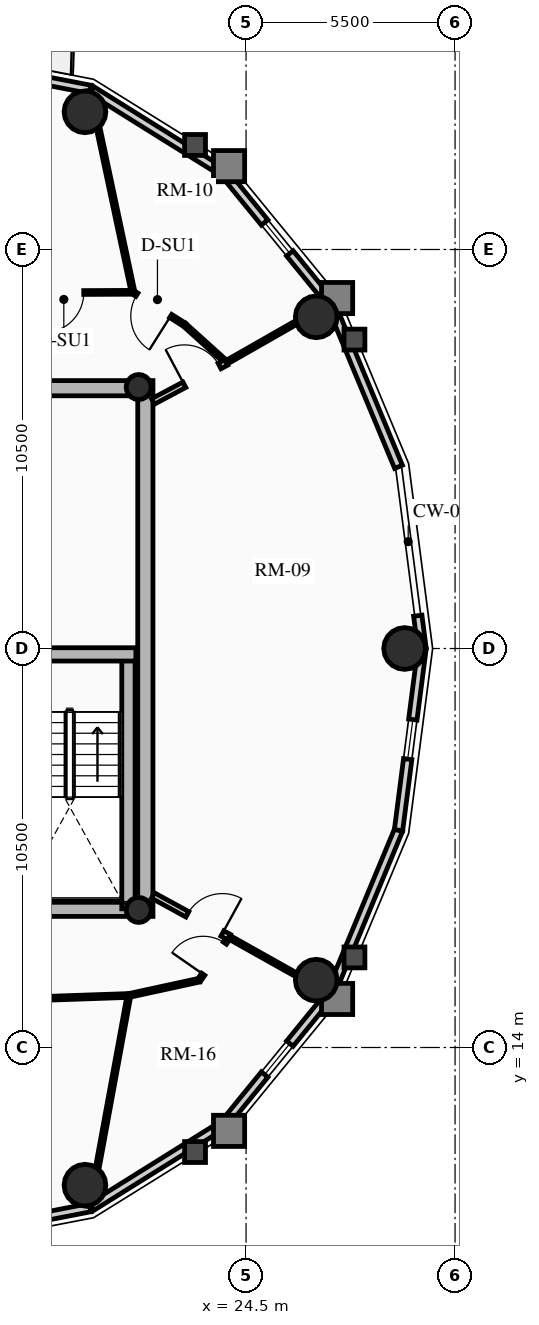
"""IFC4 building model, lengths in metres.
Left out: names, types, materials, properties, quantities, classifications, styles, units other than length and angle.
Written with IfcOpenShell. Run it as: python <this file> out.ifc"""

import sys

from ifc_helpers import new_model, si_unit, direction, frame, frame_2d, origin, origin_2d, place, context, subcontext, project, spatial, rectangle, circle, hollow_circle, extrude, source, transform, mapped, element, fill, save


model = new_model("IFC4")
c1 = context("Model", 3, precision=1e-05, world=origin(), true_north=direction((0.0, 1.0)))
c2 = subcontext(c1, "Body", "Model", "MODEL_VIEW")
j1 = project(units=[si_unit("LENGTHUNIT", "METRE"), si_unit("PLANEANGLEUNIT", "RADIAN")], contexts=[c1])
p1 = place(None, origin())
s1 = spatial("IfcSite", under=j1, at=p1, CompositionType="ELEMENT")
p2 = place(p1, origin())
s2 = spatial("IfcBuilding", under=s1, at=p2, CompositionType="ELEMENT")
p3 = place(p2, frame((0.0, 0.0, 232.45)))
s3 = spatial("IfcBuildingStorey", under=s2, at=p3, CompositionType="ELEMENT", Elevation=232.45)
p4 = place(p3, frame((21.85, 17.45, 0.0), z_axis=(0.0, 0.0, 1.0), x_axis=(0.0, 1.0, 0.0)))
e1 = element("IfcWall", 1, at=p4, inside=s3, PredefinedType="SHEAR", context=c2, shape_type="SweptSolid", body=[
    extrude(rectangle(XDim=14.1, YDim=0.4, at=frame_2d((7.05, 0.0))), origin(), (0.0, 0.0, 1.0), 3.2),
])
p5 = place(p3, frame((11.15, 17.65, 0.0), z_axis=(0.0, 0.0, 1.0), x_axis=(1.0, 0.0, 0.0)))
e2 = element("IfcWall", 2, at=p5, inside=s3, PredefinedType="SHEAR", context=c2, shape_type="SweptSolid", body=[
    extrude(rectangle(XDim=10.7, YDim=0.4, at=frame_2d((5.35, 0.0))), origin(), (0.0, 0.0, 1.0), 3.2),
])
m1 = source(origin(), c2, "Body", "SweptSolid", [
    extrude(rectangle(XDim=1.5, YDim=2.02, at=frame_2d((0.75, 1.01))), frame((0.0, 0.21, 0.0), z_axis=(0.0, -1.0, 0.0), x_axis=(1.0, 0.0, 0.0)), (0.0, 0.0, 1.0), 0.42),
])
p6 = place(p5, frame((5.45, 0.0, 0.0)))
e3 = element("IfcOpeningElement", 3, at=p6, cuts=e2, PredefinedType="OPENING", context=c2, shape_type="MappedRepresentation", body=[
    mapped(m1, transform((0.0, 0.0, 0.0), x_axis=(1.0, 0.0, 0.0), y_axis=(0.0, 1.0, 0.0), z_axis=(0.0, 0.0, 1.0), scale=1.0)),
])
p7 = place(p3, frame((11.15, 31.35, 0.0), z_axis=(0.0, 0.0, 1.0), x_axis=(1.0, 0.0, 0.0)))
e4 = element("IfcWall", 4, at=p7, inside=s3, PredefinedType="SHEAR", context=c2, shape_type="SweptSolid", body=[
    extrude(rectangle(XDim=10.7, YDim=0.4, at=frame_2d((5.35, 0.0))), origin(), (0.0, 0.0, 1.0), 3.2),
])
p8 = place(p7, frame((4.6, 0.0, 0.0)))
e5 = element("IfcOpeningElement", 5, at=p8, cuts=e4, PredefinedType="OPENING", context=c2, shape_type="MappedRepresentation", body=[
    mapped(m1, transform((0.0, 0.0, 0.0), x_axis=(1.0, 0.0, 0.0), y_axis=(0.0, 1.0, 0.0), z_axis=(0.0, 0.0, 1.0), scale=1.0)),
])
p9 = place(p3, frame((21.405, 17.65, 0.0), z_axis=(0.0, 0.0, 1.0), x_axis=(0.0, 1.0, 0.0)))
e6 = element("IfcWall", 6, at=p9, inside=s3, PredefinedType="SHEAR", context=c2, shape_type="SweptSolid", body=[
    extrude(rectangle(XDim=6.695, YDim=0.35, at=frame_2d((3.348, 0.0))), origin(), (0.0, 0.0, 1.0), 3.2),
])
p10 = place(p3, frame((18.315, 24.345, 0.0), z_axis=(0.0, 0.0, 1.0), x_axis=(1.0, 0.0, 0.0)))
e7 = element("IfcWall", 7, at=p10, inside=s3, PredefinedType="SHEAR", context=c2, shape_type="SweptSolid", body=[
    extrude(rectangle(XDim=3.285, YDim=0.35, at=frame_2d((1.643, 0.0))), origin(), (0.0, 0.0, 1.0), 3.2),
])
for number, where, z_axis, x_axis in (
    (8, (21.675, 17.62, 0.0), (0.0, 0.0, 1.0), (1.0, 0.0, 0.0)),
    (9, (21.675, 31.38, 0.0), (0.0, 0.0, 1.0), (1.0, 0.0, 0.0)),
):
    element("IfcColumn", number, at=place(p3, frame(where, z_axis=z_axis, x_axis=x_axis)), inside=s3, PredefinedType="COLUMN", context=c2, shape_type="SweptSolid", body=[
        extrude(hollow_circle(Radius=0.33, WallThickness=0.025, at=origin_2d()), origin(), (0.0, 0.0, 1.0), 3.2),
    ])
for number, where, z_axis, x_axis in (
    (10, (28.672, 24.5, 0.0), (0.0, 0.0, 1.0), (1.0, 0.0, 0.0)),
    (11, (26.347, 33.229, 0.0), (0.0, 0.0, 1.0), (1.0, 0.0, 0.0)),
    (12, (20.261, 38.623, 0.0), (0.0, 0.0, 1.0), (1.0, 0.0, 0.0)),
    (13, (20.261, 10.377, 0.0), (0.0, 0.0, 1.0), (1.0, 0.0, 0.0)),
    (14, (26.347, 15.771, 0.0), (0.0, 0.0, 1.0), (1.0, 0.0, 0.0)),
):
    element("IfcColumn", number, at=place(p3, frame(where, z_axis=z_axis, x_axis=x_axis)), inside=s3, PredefinedType="USERDEFINED", context=c2, shape_type="SweptSolid", body=[
        extrude(circle(Radius=0.55, at=origin_2d()), origin(), (0.0, 0.0, 1.0), 3.2),
    ])
p11 = place(p3, frame((29.018, 25.363, 0.0), z_axis=(0.0, 0.0, 1.0), x_axis=(0.128247365719, -0.991742211054, 0.0)))
e15 = element("IfcWall", 15, at=p11, inside=s3, PredefinedType="SOLIDWALL", context=c2, shape_type="SweptSolid", body=[
    extrude(rectangle(XDim=0.87, YDim=0.22, at=frame_2d((0.435, 0.0))), origin(), (0.0, 0.0, 1.0), 2.402),
])
p12 = place(p3, frame((26.718, 33.593, 0.0), z_axis=(0.0, 0.0, 1.0), x_axis=(0.384036305194, -0.923317993052, 0.0)))
e16 = element("IfcWall", 16, at=p12, inside=s3, PredefinedType="SOLIDWALL", context=c2, shape_type="SweptSolid", body=[
    extrude(rectangle(XDim=4.671, YDim=0.22, at=frame_2d((2.335, 0.0))), origin(), (0.0, 0.0, 1.0), 2.402),
])
p13 = place(p3, frame((23.924, 37.015, 0.0), z_axis=(0.0, 0.0, 1.0), x_axis=(0.632467166636, -0.774587169483, 0.0)))
e17 = element("IfcWall", 17, at=p13, inside=s3, PredefinedType="SOLIDWALL", context=c2, shape_type="SweptSolid", body=[
    extrude(rectangle(XDim=4.418, YDim=0.22, at=frame_2d((2.209, 0.0))), origin(), (0.0, 0.0, 1.0), 2.402),
])
m2 = source(origin(), c2, "Body", "SweptSolid", [
    extrude(rectangle(XDim=1.05, YDim=1.3, at=frame_2d((0.525, 0.65))), frame((0.0, 0.12, 0.0), z_axis=(0.0, -1.0, 0.0), x_axis=(1.0, 0.0, 0.0)), (0.0, 0.0, 1.0), 0.24),
])
p14 = place(p13, frame((1.684, 0.0, 0.65)))
e18 = element("IfcOpeningElement", 18, at=p14, cuts=e17, PredefinedType="OPENING", context=c2, shape_type="MappedRepresentation", body=[
    mapped(m2, transform((0.0, 0.0, 0.0), x_axis=(1.0, 0.0, 0.0), y_axis=(0.0, 1.0, 0.0), z_axis=(0.0, 0.0, 1.0), scale=1.0)),
])
p15 = place(p3, frame((20.403, 39.213, 0.0), z_axis=(0.0, 0.0, 1.0), x_axis=(0.848318713376, -0.529485939886, 0.0)))
e19 = element("IfcWall", 19, at=p15, inside=s3, PredefinedType="SOLIDWALL", context=c2, shape_type="SweptSolid", body=[
    extrude(rectangle(XDim=4.15, YDim=0.22, at=frame_2d((2.075, 0.0))), origin(), (0.0, 0.0, 1.0), 2.402),
])
p16 = place(p3, frame((16.5, 39.97, 0.0), z_axis=(0.0, 0.0, 1.0), x_axis=(0.981700307484, -0.190432419211, 0.0)))
e20 = element("IfcWall", 20, at=p16, inside=s3, PredefinedType="SOLIDWALL", context=c2, shape_type="SweptSolid", body=[
    extrude(rectangle(XDim=3.976, YDim=0.22, at=frame_2d((1.988, 0.0))), origin(), (0.0, 0.0, 1.0), 2.402),
])
m3 = source(origin(), c2, "Body", "SweptSolid", [
    extrude(rectangle(XDim=1.15, YDim=2.005, at=frame_2d((0.575, 1.002))), frame((0.0, 0.12, 0.0), z_axis=(0.0, -1.0, 0.0), x_axis=(1.0, 0.0, 0.0)), (0.0, 0.0, 1.0), 0.24),
])
p17 = place(p16, frame((1.413, 0.0, 0.0)))
e21 = element("IfcOpeningElement", 21, at=p17, cuts=e20, PredefinedType="OPENING", context=c2, shape_type="MappedRepresentation", body=[
    mapped(m3, transform((0.0, 0.0, 0.0), x_axis=(1.0, 0.0, 0.0), y_axis=(0.0, 1.0, 0.0), z_axis=(0.0, 0.0, 1.0), scale=1.0)),
])
p18 = place(p3, frame((20.403, 9.787, 0.0), z_axis=(0.0, 0.0, 1.0), x_axis=(-0.981700307484, -0.190432419211, 0.0)))
e22 = element("IfcWall", 22, at=p18, inside=s3, PredefinedType="SOLIDWALL", context=c2, shape_type="SweptSolid", body=[
    extrude(rectangle(XDim=3.976, YDim=0.22, at=frame_2d((1.988, 0.0))), origin(), (0.0, 0.0, 1.0), 2.402),
])
p19 = place(p18, frame((1.463, 0.0, 0.65)))
e23 = element("IfcOpeningElement", 23, at=p19, cuts=e22, PredefinedType="OPENING", context=c2, shape_type="MappedRepresentation", body=[
    mapped(m2, transform((0.0, 0.0, 0.0), x_axis=(1.0, 0.0, 0.0), y_axis=(0.0, 1.0, 0.0), z_axis=(0.0, 0.0, 1.0), scale=1.0)),
])
p20 = place(p3, frame((23.924, 11.985, 0.0), z_axis=(0.0, 0.0, 1.0), x_axis=(-0.848318713376, -0.529485939886, 0.0)))
e24 = element("IfcWall", 24, at=p20, inside=s3, PredefinedType="SOLIDWALL", context=c2, shape_type="SweptSolid", body=[
    extrude(rectangle(XDim=4.15, YDim=0.22, at=frame_2d((2.075, 0.0))), origin(), (0.0, 0.0, 1.0), 2.402),
])
p21 = place(p3, frame((26.718, 15.407, 0.0), z_axis=(0.0, 0.0, 1.0), x_axis=(-0.632467166636, -0.774587169483, 0.0)))
e25 = element("IfcWall", 25, at=p21, inside=s3, PredefinedType="SOLIDWALL", context=c2, shape_type="SweptSolid", body=[
    extrude(rectangle(XDim=4.418, YDim=0.22, at=frame_2d((2.209, 0.0))), origin(), (0.0, 0.0, 1.0), 2.402),
])
p22 = place(p21, frame((1.684, 0.0, 0.65)))
e26 = element("IfcOpeningElement", 26, at=p22, cuts=e25, PredefinedType="OPENING", context=c2, shape_type="MappedRepresentation", body=[
    mapped(m2, transform((0.0, 0.0, 0.0), x_axis=(1.0, 0.0, 0.0), y_axis=(0.0, 1.0, 0.0), z_axis=(0.0, 0.0, 1.0), scale=1.0)),
])
p23 = place(p3, frame((28.512, 19.719, 0.0), z_axis=(0.0, 0.0, 1.0), x_axis=(-0.384036305194, -0.923317993052, 0.0)))
e27 = element("IfcWall", 27, at=p23, inside=s3, PredefinedType="SOLIDWALL", context=c2, shape_type="SweptSolid", body=[
    extrude(rectangle(XDim=4.671, YDim=0.22, at=frame_2d((2.335, 0.0))), origin(), (0.0, 0.0, 1.0), 2.402),
])
p24 = place(p3, frame((29.13, 24.5, 0.0), z_axis=(0.0, 0.0, 1.0), x_axis=(-0.128241318541, -0.991742993027, 0.0)))
e28 = element("IfcWall", 28, at=p24, inside=s3, PredefinedType="SOLIDWALL", context=c2, shape_type="SweptSolid", body=[
    extrude(rectangle(XDim=4.82, YDim=0.22, at=frame_2d((2.41, 0.0))), origin(), (0.0, 0.0, 1.0), 2.402),
])
p25 = place(p24, frame((1.885, 0.0, 0.65)))
e29 = element("IfcOpeningElement", 29, at=p25, cuts=e28, PredefinedType="OPENING", context=c2, shape_type="MappedRepresentation", body=[
    mapped(m2, transform((0.0, 0.0, 0.0), x_axis=(1.0, 0.0, 0.0), y_axis=(0.0, 1.0, 0.0), z_axis=(0.0, 0.0, 1.0), scale=1.0)),
])
p26 = place(p3, frame((23.98, 32.027, 0.0), z_axis=(0.0, 0.0, 1.0), x_axis=(-0.742353224332, 0.670008724065, 0.0)))
e30 = element("IfcWall", 30, at=p26, inside=s3, PredefinedType="MOVABLE", context=c2, shape_type="SweptSolid", body=[
    extrude(rectangle(XDim=1.485, YDim=0.1, at=frame_2d((0.742, 0.0))), origin(), (0.0, 0.0, 1.0), 2.402),
])
p27 = place(p3, frame((22.877, 33.022, 0.0), z_axis=(0.0, 0.0, 1.0), x_axis=(-0.845895608855, 0.533348496689, 0.0)))
e31 = element("IfcWall", 31, at=p27, inside=s3, PredefinedType="MOVABLE", context=c2, shape_type="SweptSolid", body=[
    extrude(rectangle(XDim=1.597, YDim=0.1, at=frame_2d((0.798, 0.0))), origin(), (0.0, 0.0, 1.0), 2.335),
])
m4 = source(origin(), c2, "Body", "SweptSolid", [
    extrude(rectangle(XDim=1.05, YDim=2.015, at=frame_2d((0.525, 1.007))), frame((0.0, 0.06, 0.0), z_axis=(0.0, -1.0, 0.0), x_axis=(1.0, 0.0, 0.0)), (0.0, 0.0, 1.0), 0.12),
])
p28 = place(p27, frame((0.427, 0.0, 0.0)))
e32 = element("IfcOpeningElement", 32, at=p28, cuts=e31, PredefinedType="OPENING", context=c2, shape_type="MappedRepresentation", body=[
    mapped(m4, transform((0.0, 0.0, 0.0), x_axis=(1.0, 0.0, 0.0), y_axis=(0.0, 1.0, 0.0), z_axis=(0.0, 0.0, 1.0), scale=1.0)),
])
p29 = place(p3, frame((21.527, 33.873, 0.0), z_axis=(0.0, 0.0, 1.0), x_axis=(-0.999991838845, -0.004040079574, 0.0)))
e33 = element("IfcWall", 33, at=p29, inside=s3, PredefinedType="MOVABLE", context=c2, shape_type="SweptSolid", body=[
    extrude(rectangle(XDim=3.384, YDim=0.1, at=frame_2d((1.692, 0.0))), origin(), (0.0, 0.0, 1.0), 2.402),
])
p30 = place(p29, frame((1.298, 0.0, 0.0)))
e34 = element("IfcOpeningElement", 34, at=p30, cuts=e33, PredefinedType="OPENING", context=c2, shape_type="MappedRepresentation", body=[
    mapped(m4, transform((0.0, 0.0, 0.0), x_axis=(1.0, 0.0, 0.0), y_axis=(0.0, 1.0, 0.0), z_axis=(0.0, 0.0, 1.0), scale=1.0)),
])
p31 = place(p3, frame((14.781, 15.141, 0.0), z_axis=(0.0, 0.0, 1.0), x_axis=(0.999407918707, 0.034406569513, 0.0)))
e35 = element("IfcWall", 35, at=p31, inside=s3, PredefinedType="MOVABLE", context=c2, shape_type="SweptSolid", body=[
    extrude(rectangle(XDim=6.642, YDim=0.1, at=frame_2d((3.321, 0.0))), origin(), (0.0, 0.0, 1.0), 2.335),
])
p32 = place(p31, frame((2.796, 0.0, 0.0)))
e36 = element("IfcOpeningElement", 36, at=p32, cuts=e35, PredefinedType="OPENING", context=c2, shape_type="MappedRepresentation", body=[
    mapped(m4, transform((0.0, 0.0, 0.0), x_axis=(1.0, 0.0, 0.0), y_axis=(0.0, 1.0, 0.0), z_axis=(0.0, 0.0, 1.0), scale=1.0)),
])
p33 = place(p3, frame((21.419, 15.369, 0.0), z_axis=(0.0, 0.0, 1.0), x_axis=(0.977192701953, 0.212354475464, 0.0)))
e37 = element("IfcWall", 37, at=p33, inside=s3, PredefinedType="MOVABLE", context=c2, shape_type="SweptSolid", body=[
    extrude(rectangle(XDim=1.888, YDim=0.1, at=frame_2d((0.944, 0.0))), origin(), (0.0, 0.0, 1.0), 2.335),
])
p34 = place(p3, frame((23.263, 15.77, 0.0), z_axis=(0.0, 0.0, 1.0), x_axis=(0.570743456919, 0.821128434768, 0.0)))
e38 = element("IfcWall", 38, at=p34, inside=s3, PredefinedType="MOVABLE", context=c2, shape_type="SweptSolid", body=[
    extrude(rectangle(XDim=1.382, YDim=0.1, at=frame_2d((0.691, 0.0))), origin(), (0.0, 0.0, 1.0), 2.402),
])
m5 = source(origin(), c2, "Body", "SweptSolid", [
    extrude(rectangle(XDim=1.0, YDim=2.015, at=frame_2d((0.5, 1.007))), frame((0.0, 0.06, 0.0), z_axis=(0.0, -1.0, 0.0), x_axis=(1.0, 0.0, 0.0)), (0.0, 0.0, 1.0), 0.12),
])
p35 = place(p34, frame((0.191, 0.0, 0.0)))
e39 = element("IfcOpeningElement", 39, at=p35, cuts=e38, PredefinedType="OPENING", context=c2, shape_type="MappedRepresentation", body=[
    mapped(m5, transform((0.0, 0.0, 0.0), x_axis=(1.0, 0.0, 0.0), y_axis=(0.0, 1.0, 0.0), z_axis=(0.0, 0.0, 1.0), scale=1.0)),
])
p36 = place(p3, frame((23.98, 32.027, 0.0), z_axis=(0.0, 0.0, 1.0), x_axis=(0.868372526378, 0.495912447345, 0.0)))
e40 = element("IfcWall", 40, at=p36, inside=s3, PredefinedType="MOVABLE", context=c2, shape_type="SweptSolid", body=[
    extrude(rectangle(XDim=3.135, YDim=0.1, at=frame_2d((1.567, 0.0))), origin(), (0.0, 0.0, 1.0), 2.402),
])
p37 = place(p3, frame((21.527, 33.873, 0.0), z_axis=(0.0, 0.0, 1.0), x_axis=(-0.207772326864, 0.97817721308, 0.0)))
e41 = element("IfcWall", 41, at=p37, inside=s3, PredefinedType="MOVABLE", context=c2, shape_type="SweptSolid", body=[
    extrude(rectangle(XDim=5.439, YDim=0.1, at=frame_2d((2.72, 0.0))), origin(), (0.0, 0.0, 1.0), 2.402),
])
p38 = place(p3, frame((21.419, 15.369, 0.0), z_axis=(0.0, 0.0, 1.0), x_axis=(-0.180685606423, -0.98354090491, 0.0)))
e42 = element("IfcWall", 42, at=p38, inside=s3, PredefinedType="MOVABLE", context=c2, shape_type="SweptSolid", body=[
    extrude(rectangle(XDim=5.656, YDim=0.1, at=frame_2d((2.828, 0.0))), origin(), (0.0, 0.0, 1.0), 2.402),
])
p39 = place(p3, frame((24.052, 16.905, 0.0), z_axis=(0.0, 0.0, 1.0), x_axis=(0.872220814965, -0.489112308106, 0.0)))
e43 = element("IfcWall", 43, at=p39, inside=s3, PredefinedType="MOVABLE", context=c2, shape_type="SweptSolid", body=[
    extrude(rectangle(XDim=3.038, YDim=0.1, at=frame_2d((1.519, 0.0))), origin(), (0.0, 0.0, 1.0), 2.402),
])
p40 = place(p3, frame((22.05, 31.0, 0.0), z_axis=(0.0, 0.0, 1.0), x_axis=(0.882791584709, 0.469764853908, 0.0)))
e44 = element("IfcWall", 44, at=p40, inside=s3, PredefinedType="PARTITIONING", context=c2, shape_type="SweptSolid", body=[
    extrude(rectangle(XDim=2.186, YDim=0.16, at=frame_2d((1.093, 0.0))), origin(), (0.0, 0.0, 1.0), 2.335),
])
m6 = source(origin(), c2, "Body", "SweptSolid", [
    extrude(rectangle(XDim=1.05, YDim=2.015, at=frame_2d((0.525, 1.007))), frame((0.0, 0.09, 0.0), z_axis=(0.0, -1.0, 0.0), x_axis=(1.0, 0.0, 0.0)), (0.0, 0.0, 1.0), 0.18),
])
p41 = place(p40, frame((0.936, 0.0, 0.0)))
e45 = element("IfcOpeningElement", 45, at=p41, cuts=e44, PredefinedType="OPENING", context=c2, shape_type="MappedRepresentation", body=[
    mapped(m6, transform((0.0, 0.0, 0.0), x_axis=(1.0, 0.0, 0.0), y_axis=(0.0, 1.0, 0.0), z_axis=(0.0, 0.0, 1.0), scale=1.0)),
])
p42 = place(p3, frame((22.05, 18.0, 0.0), z_axis=(0.0, 0.0, 1.0), x_axis=(0.877252891813, -0.480028503118, 0.0)))
e46 = element("IfcWall", 46, at=p42, inside=s3, PredefinedType="PARTITIONING", context=c2, shape_type="SweptSolid", body=[
    extrude(rectangle(XDim=2.282, YDim=0.16, at=frame_2d((1.141, 0.0))), origin(), (0.0, 0.0, 1.0), 2.335),
])
p43 = place(p42, frame((1.032, 0.0, 0.0)))
e47 = element("IfcOpeningElement", 47, at=p43, cuts=e46, PredefinedType="OPENING", context=c2, shape_type="MappedRepresentation", body=[
    mapped(m6, transform((0.0, 0.0, 0.0), x_axis=(1.0, 0.0, 0.0), y_axis=(0.0, 1.0, 0.0), z_axis=(0.0, 0.0, 1.0), scale=1.0)),
])
m7 = source(origin(), c2, "Body", "SweptSolid", [
    extrude(rectangle(XDim=1.05, YDim=1.3, at=frame_2d((0.525, 0.65))), frame((0.0, 0.03, 0.0), z_axis=(0.0, -1.0, 0.0), x_axis=(1.0, 0.0, 0.0)), (0.0, 0.0, 1.0), 0.06),
])
p44 = place(p14, origin())
e48 = element("IfcWindow", 48, at=p44, inside=s3, PartitioningType="SINGLE_PANEL", PredefinedType="WINDOW", context=c2, shape_type="MappedRepresentation", body=[
    mapped(m7, transform((0.0, 0.0, 0.0), x_axis=(1.0, 0.0, 0.0), y_axis=(0.0, 1.0, 0.0), z_axis=(0.0, 0.0, 1.0), scale=1.0)),
])
fill(e18, e48)
p45 = place(p22, origin())
e49 = element("IfcWindow", 49, at=p45, inside=s3, PartitioningType="SINGLE_PANEL", PredefinedType="WINDOW", context=c2, shape_type="MappedRepresentation", body=[
    mapped(m7, transform((0.0, 0.0, 0.0), x_axis=(1.0, 0.0, 0.0), y_axis=(0.0, 1.0, 0.0), z_axis=(0.0, 0.0, 1.0), scale=1.0)),
])
fill(e26, e49)
p46 = place(p25, origin())
e50 = element("IfcWindow", 50, at=p46, inside=s3, PartitioningType="SINGLE_PANEL", PredefinedType="WINDOW", context=c2, shape_type="MappedRepresentation", body=[
    mapped(m7, transform((0.0, 0.0, 0.0), x_axis=(1.0, 0.0, 0.0), y_axis=(0.0, 1.0, 0.0), z_axis=(0.0, 0.0, 1.0), scale=1.0)),
])
fill(e29, e50)
m8 = source(origin(), c2, "Body", "SweptSolid", [
    extrude(rectangle(XDim=1.05, YDim=2.015, at=frame_2d((0.525, 1.007))), frame((0.0, 0.025, 0.0), z_axis=(0.0, -1.0, 0.0), x_axis=(1.0, 0.0, 0.0)), (0.0, 0.0, 1.0), 0.05),
])
p47 = place(p41, origin())
e51 = element("IfcDoor", 51, at=p47, inside=s3, OperationType="SINGLE_SWING_LEFT", PredefinedType="DOOR", context=c2, shape_type="MappedRepresentation", body=[
    mapped(m8, transform((0.0, 0.0, 0.0), x_axis=(1.0, 0.0, 0.0), y_axis=(0.0, 1.0, 0.0), z_axis=(0.0, 0.0, 1.0), scale=1.0)),
])
fill(e45, e51)
p48 = place(p43, origin())
e52 = element("IfcDoor", 52, at=p48, inside=s3, OperationType="SINGLE_SWING_RIGHT", PredefinedType="DOOR", context=c2, shape_type="MappedRepresentation", body=[
    mapped(m8, transform((0.0, 0.0, 0.0), x_axis=(1.0, 0.0, 0.0), y_axis=(0.0, 1.0, 0.0), z_axis=(0.0, 0.0, 1.0), scale=1.0)),
])
fill(e47, e52)
p49 = place(p28, origin())
e53 = element("IfcDoor", 53, at=p49, inside=s3, OperationType="SINGLE_SWING_LEFT", PredefinedType="DOOR", context=c2, shape_type="MappedRepresentation", body=[
    mapped(m8, transform((0.0, 0.0, 0.0), x_axis=(1.0, 0.0, 0.0), y_axis=(0.0, 1.0, 0.0), z_axis=(0.0, 0.0, 1.0), scale=1.0)),
])
fill(e32, e53)
p50 = place(p30, origin())
e54 = element("IfcDoor", 54, at=p50, inside=s3, OperationType="SINGLE_SWING_RIGHT", PredefinedType="DOOR", context=c2, shape_type="MappedRepresentation", body=[
    mapped(m8, transform((0.0, 0.0, 0.0), x_axis=(1.0, 0.0, 0.0), y_axis=(0.0, 1.0, 0.0), z_axis=(0.0, 0.0, 1.0), scale=1.0)),
])
fill(e34, e54)
m9 = source(origin(), c2, "Body", "SweptSolid", [
    extrude(rectangle(XDim=1.0, YDim=2.015, at=frame_2d((0.5, 1.007))), frame((0.0, 0.025, 0.0), z_axis=(0.0, -1.0, 0.0), x_axis=(1.0, 0.0, 0.0)), (0.0, 0.0, 1.0), 0.05),
])
p51 = place(p35, origin())
e55 = element("IfcDoor", 55, at=p51, inside=s3, OperationType="SINGLE_SWING_LEFT", PredefinedType="DOOR", context=c2, shape_type="MappedRepresentation", body=[
    mapped(m9, transform((0.0, 0.0, 0.0), x_axis=(1.0, 0.0, 0.0), y_axis=(0.0, 1.0, 0.0), z_axis=(0.0, 0.0, 1.0), scale=1.0)),
])
fill(e39, e55)
save(model, sys.argv[1])
